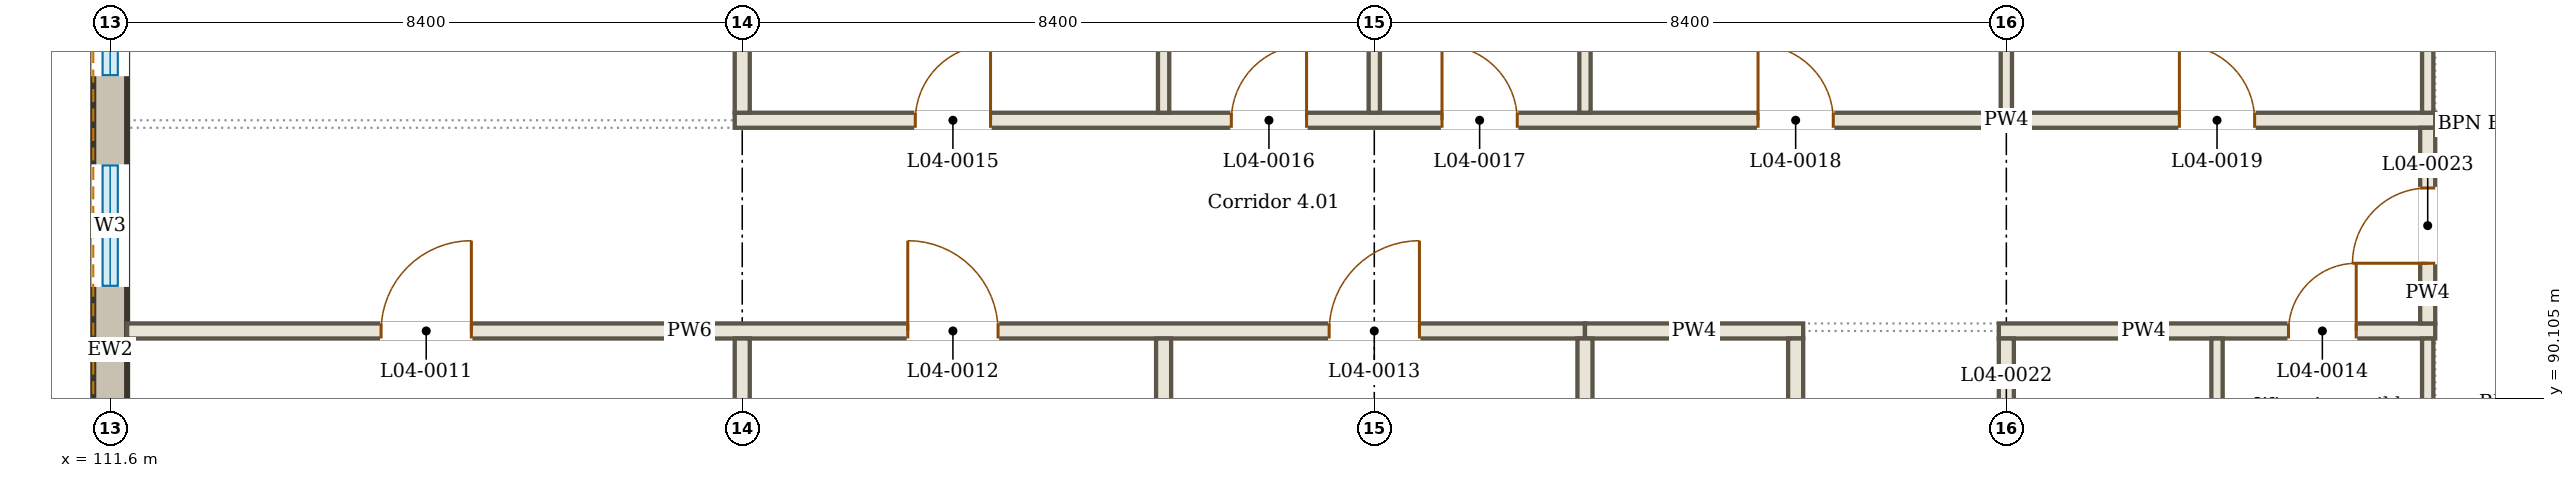
"""IFC4 building model, lengths in metres.
Left out: names, types, materials, properties, quantities, classifications, styles, units other than length and angle.
Written with IfcOpenShell. Run it as: python <this file> out.ifc"""

import sys

from ifc_helpers import new_model, si_unit, direction, frame, frame_2d, origin, place, context, subcontext, project, spatial, rectangle, extrude, element, fill, save


model = new_model("IFC4")
c1 = context("Model", 3, precision=1e-05, world=origin(), true_north=direction((0.0, 1.0)))
c2 = subcontext(c1, "Body", "Model", "MODEL_VIEW")
j1 = project(units=[si_unit("LENGTHUNIT", "METRE"), si_unit("PLANEANGLEUNIT", "RADIAN")], contexts=[c1])
p1 = place(None, origin())
s1 = spatial("IfcSite", under=j1, at=p1, CompositionType="ELEMENT")
p2 = place(p1, origin())
s2 = spatial("IfcBuilding", under=s1, at=p2, CompositionType="ELEMENT")
p3 = place(p2, frame((0.0, 0.0, 18.0)))
s3 = spatial("IfcBuildingStorey", under=s2, at=p3, CompositionType="ELEMENT", Elevation=18.0)
p4 = place(p3, frame((111.6, 88.35, 0.0), z_axis=(0.0, 0.0, 1.0), x_axis=(0.0, 1.0, 0.0)))
e1 = element("IfcWall", 1, at=p4, inside=s3, PredefinedType="SOLIDWALL", context=c2, shape_type="SweptSolid", body=[
    extrude(rectangle(XDim=8.25, YDim=0.45, at=frame_2d((4.125, 0.0))), origin(), (0.0, 0.0, 1.0), 3.8),
])
p5 = place(p4, frame((0.95, 0.0, 2.1)))
e2 = element("IfcOpeningElement", 2, at=p5, cuts=e1, PredefinedType="OPENING", context=c2, shape_type="SweptSolid", body=[
    extrude(rectangle(XDim=0.6, YDim=1.2, at=frame_2d((0.3, 0.6))), frame((0.0, 0.235, 0.0), z_axis=(0.0, -1.0, 0.0), x_axis=(1.0, 0.0, 0.0)), (0.0, 0.0, 1.0), 0.47),
])
p6 = place(p4, frame((3.25, 0.0, 2.7)))
e3 = element("IfcOpeningElement", 3, at=p6, cuts=e1, PredefinedType="OPENING", context=c2, shape_type="SweptSolid", body=[
    extrude(rectangle(XDim=1.6, YDim=0.6, at=frame_2d((0.8, 0.3))), frame((0.0, 0.235, 0.0), z_axis=(0.0, -1.0, 0.0), x_axis=(1.0, 0.0, 0.0)), (0.0, 0.0, 1.0), 0.47),
])
p7 = place(p4, frame((6.05, 0.0, 2.7)))
e4 = element("IfcOpeningElement", 4, at=p7, cuts=e1, PredefinedType="OPENING", context=c2, shape_type="SweptSolid", body=[
    extrude(rectangle(XDim=1.6, YDim=0.6, at=frame_2d((0.8, 0.3))), frame((0.0, 0.235, 0.0), z_axis=(0.0, -1.0, 0.0), x_axis=(1.0, 0.0, 0.0)), (0.0, 0.0, 1.0), 0.47),
])
p8 = place(p3, frame((111.44, 88.35, 3.82), z_axis=(0.0, 0.0, 1.0), x_axis=(0.0, 1.0, 0.0)))
e5 = element("IfcWall", 5, at=p8, inside=s3, PredefinedType="SOLIDWALL", context=c2, shape_type="SweptSolid", body=[
    extrude(rectangle(XDim=8.25, YDim=0.13, at=frame_2d((4.125, 0.0))), origin(), (0.0, 0.0, 1.0), 0.68),
])
p9 = place(p3, frame((111.825, 91.0, 0.0), z_axis=(0.0, 0.0, 1.0), x_axis=(1.0, 0.0, 0.0)))
e6 = element("IfcWall", 6, at=p9, inside=s3, PredefinedType="PARTITIONING", context=c2, shape_type="SweptSolid", body=[
    extrude(rectangle(XDim=19.375, YDim=0.2, at=frame_2d((9.688, 0.0))), origin(), (0.0, 0.0, 1.0), 3.75),
])
p10 = place(p9, frame((3.375, 0.0, 0.0)))
e7 = element("IfcOpeningElement", 7, at=p10, cuts=e6, PredefinedType="OPENING", context=c2, shape_type="SweptSolid", body=[
    extrude(rectangle(XDim=1.2, YDim=2.1, at=frame_2d((0.6, 1.05))), frame((0.0, 0.11, 0.0), z_axis=(0.0, -1.0, 0.0), x_axis=(1.0, 0.0, 0.0)), (0.0, 0.0, 1.0), 0.22),
])
p11 = place(p9, frame((10.375, 0.0, 0.0)))
e8 = element("IfcOpeningElement", 8, at=p11, cuts=e6, PredefinedType="OPENING", context=c2, shape_type="SweptSolid", body=[
    extrude(rectangle(XDim=1.2, YDim=2.1, at=frame_2d((0.6, 1.05))), frame((0.0, 0.11, 0.0), z_axis=(0.0, -1.0, 0.0), x_axis=(1.0, 0.0, 0.0)), (0.0, 0.0, 1.0), 0.22),
])
p12 = place(p9, frame((15.975, 0.0, 0.0)))
e9 = element("IfcOpeningElement", 9, at=p12, cuts=e6, PredefinedType="OPENING", context=c2, shape_type="SweptSolid", body=[
    extrude(rectangle(XDim=1.2, YDim=2.1, at=frame_2d((0.6, 1.05))), frame((0.0, 0.11, 0.0), z_axis=(0.0, -1.0, 0.0), x_axis=(1.0, 0.0, 0.0)), (0.0, 0.0, 1.0), 0.22),
])
p13 = place(p3, frame((131.2, 91.0, 0.0), z_axis=(0.0, 0.0, 1.0), x_axis=(1.0, 0.0, 0.0)))
e10 = element("IfcWall", 10, at=p13, inside=s3, PredefinedType="PARTITIONING", context=c2, shape_type="SweptSolid", body=[
    extrude(rectangle(XDim=2.9, YDim=0.2, at=frame_2d((1.45, 0.0))), origin(), (0.0, 0.0, 1.0), 3.894),
])
p14 = place(p3, frame((136.7, 91.0, 0.0), z_axis=(0.0, 0.0, 1.0), x_axis=(1.0, 0.0, 0.0)))
e11 = element("IfcWall", 11, at=p14, inside=s3, PredefinedType="PARTITIONING", context=c2, shape_type="SweptSolid", body=[
    extrude(rectangle(XDim=5.8, YDim=0.2, at=frame_2d((2.9, 0.0))), origin(), (0.0, 0.0, 1.0), 3.75),
])
p15 = place(p14, frame((3.85, 0.0, 0.0)))
e12 = element("IfcOpeningElement", 12, at=p15, cuts=e11, PredefinedType="OPENING", context=c2, shape_type="SweptSolid", body=[
    extrude(rectangle(XDim=0.9, YDim=2.1, at=frame_2d((0.45, 1.05))), frame((0.0, 0.11, 0.0), z_axis=(0.0, -1.0, 0.0), x_axis=(1.0, 0.0, 0.0)), (0.0, 0.0, 1.0), 0.22),
])
p16 = place(p3, frame((119.9, 93.8, 0.0), z_axis=(0.0, 0.0, 1.0), x_axis=(1.0, 0.0, 0.0)))
e13 = element("IfcWall", 13, at=p16, inside=s3, PredefinedType="PARTITIONING", context=c2, shape_type="SweptSolid", body=[
    extrude(rectangle(XDim=22.6, YDim=0.2, at=frame_2d((11.3, 0.0))), origin(), (0.0, 0.0, 1.0), 3.75),
])
p17 = place(p16, frame((2.4, 0.0, 0.0)))
e14 = element("IfcOpeningElement", 14, at=p17, cuts=e13, PredefinedType="OPENING", context=c2, shape_type="SweptSolid", body=[
    extrude(rectangle(XDim=1.0, YDim=2.1, at=frame_2d((0.5, 1.05))), frame((0.0, 0.11, 0.0), z_axis=(0.0, -1.0, 0.0), x_axis=(1.0, 0.0, 0.0)), (0.0, 0.0, 1.0), 0.22),
])
p18 = place(p16, frame((6.6, 0.0, 0.0)))
e15 = element("IfcOpeningElement", 15, at=p18, cuts=e13, PredefinedType="OPENING", context=c2, shape_type="SweptSolid", body=[
    extrude(rectangle(XDim=1.0, YDim=2.1, at=frame_2d((0.5, 1.05))), frame((0.0, 0.11, 0.0), z_axis=(0.0, -1.0, 0.0), x_axis=(1.0, 0.0, 0.0)), (0.0, 0.0, 1.0), 0.22),
])
p19 = place(p16, frame((9.4, 0.0, 0.0)))
e16 = element("IfcOpeningElement", 16, at=p19, cuts=e13, PredefinedType="OPENING", context=c2, shape_type="SweptSolid", body=[
    extrude(rectangle(XDim=1.0, YDim=2.1, at=frame_2d((0.5, 1.05))), frame((0.0, 0.11, 0.0), z_axis=(0.0, -1.0, 0.0), x_axis=(1.0, 0.0, 0.0)), (0.0, 0.0, 1.0), 0.22),
])
p20 = place(p16, frame((13.6, 0.0, 0.0)))
e17 = element("IfcOpeningElement", 17, at=p20, cuts=e13, PredefinedType="OPENING", context=c2, shape_type="SweptSolid", body=[
    extrude(rectangle(XDim=1.0, YDim=2.1, at=frame_2d((0.5, 1.05))), frame((0.0, 0.11, 0.0), z_axis=(0.0, -1.0, 0.0), x_axis=(1.0, 0.0, 0.0)), (0.0, 0.0, 1.0), 0.22),
])
p21 = place(p16, frame((19.2, 0.0, 0.0)))
e18 = element("IfcOpeningElement", 18, at=p21, cuts=e13, PredefinedType="OPENING", context=c2, shape_type="SweptSolid", body=[
    extrude(rectangle(XDim=1.0, YDim=2.1, at=frame_2d((0.5, 1.05))), frame((0.0, 0.11, 0.0), z_axis=(0.0, -1.0, 0.0), x_axis=(1.0, 0.0, 0.0)), (0.0, 0.0, 1.0), 0.22),
])
p22 = place(p3, frame((120.0, 88.397, 0.0), z_axis=(0.0, 0.0, 1.0), x_axis=(0.0, 1.0, 0.0)))
e19 = element("IfcWall", 19, at=p22, inside=s3, PredefinedType="PARTITIONING", context=c2, shape_type="SweptSolid", body=[
    extrude(rectangle(XDim=2.502, YDim=0.2, at=frame_2d((1.251, 0.0))), origin(), (0.0, 0.0, 1.0), 3.75),
])
p23 = place(p3, frame((120.0, 93.9, 0.0), z_axis=(0.0, 0.0, 1.0), x_axis=(0.0, 1.0, 0.0)))
e20 = element("IfcWall", 20, at=p23, inside=s3, PredefinedType="PARTITIONING", context=c2, shape_type="SweptSolid", body=[
    extrude(rectangle(XDim=2.7, YDim=0.2, at=frame_2d((1.35, 0.0))), origin(), (0.0, 0.0, 1.0), 3.75),
])
p24 = place(p3, frame((125.6, 80.025, 0.0), z_axis=(0.0, 0.0, 1.0), x_axis=(0.0, 1.0, 0.0)))
e21 = element("IfcWall", 21, at=p24, inside=s3, PredefinedType="PARTITIONING", context=c2, shape_type="SweptSolid", body=[
    extrude(rectangle(XDim=10.875, YDim=0.2, at=frame_2d((5.438, 0.0))), origin(), (0.0, 0.0, 1.0), 3.75),
])
p25 = place(p3, frame((125.6, 93.9, 0.0), z_axis=(0.0, 0.0, 1.0), x_axis=(0.0, 1.0, 0.0)))
e22 = element("IfcWall", 22, at=p25, inside=s3, PredefinedType="PARTITIONING", context=c2, shape_type="SweptSolid", body=[
    extrude(rectangle(XDim=10.875, YDim=0.15, at=frame_2d((5.438, 0.0))), origin(), (0.0, 0.0, 1.0), 3.75),
])
p26 = place(p3, frame((128.4, 93.9, 0.0), z_axis=(0.0, 0.0, 1.0), x_axis=(0.0, 1.0, 0.0)))
e23 = element("IfcWall", 23, at=p26, inside=s3, PredefinedType="PARTITIONING", context=c2, shape_type="SweptSolid", body=[
    extrude(rectangle(XDim=2.503, YDim=0.15, at=frame_2d((1.251, 0.0))), origin(), (0.0, 0.0, 1.0), 3.75),
])
p27 = place(p3, frame((131.2, 80.025, 0.0), z_axis=(0.0, 0.0, 1.0), x_axis=(0.0, 1.0, 0.0)))
e24 = element("IfcWall", 24, at=p27, inside=s3, PredefinedType="PARTITIONING", context=c2, shape_type="SweptSolid", body=[
    extrude(rectangle(XDim=10.875, YDim=0.2, at=frame_2d((5.438, 0.0))), origin(), (0.0, 0.0, 1.0), 3.75),
])
p28 = place(p3, frame((131.2, 93.9, 0.0), z_axis=(0.0, 0.0, 1.0), x_axis=(0.0, 1.0, 0.0)))
e25 = element("IfcWall", 25, at=p28, inside=s3, PredefinedType="PARTITIONING", context=c2, shape_type="SweptSolid", body=[
    extrude(rectangle(XDim=10.875, YDim=0.15, at=frame_2d((5.438, 0.0))), origin(), (0.0, 0.0, 1.0), 3.75),
])
p29 = place(p3, frame((134.0, 82.3, 0.0), z_axis=(0.0, 0.0, 1.0), x_axis=(0.0, 1.0, 0.0)))
e26 = element("IfcWall", 26, at=p29, inside=s3, PredefinedType="PARTITIONING", context=c2, shape_type="SweptSolid", body=[
    extrude(rectangle(XDim=8.6, YDim=0.2, at=frame_2d((4.3, 0.0))), origin(), (0.0, 0.0, 1.0), 3.75),
])
p30 = place(p29, frame((3.8, 0.0, 0.0)))
e27 = element("IfcOpeningElement", 27, at=p30, cuts=e26, PredefinedType="OPENING", context=c2, shape_type="SweptSolid", body=[
    extrude(rectangle(XDim=1.0, YDim=2.1, at=frame_2d((0.5, 1.05))), frame((0.0, 0.11, 0.0), z_axis=(0.0, -1.0, 0.0), x_axis=(1.0, 0.0, 0.0)), (0.0, 0.0, 1.0), 0.22),
])
p31 = place(p3, frame((136.8, 88.2, 0.0), z_axis=(0.0, 0.0, 1.0), x_axis=(0.0, 1.0, 0.0)))
e28 = element("IfcWall", 28, at=p31, inside=s3, PredefinedType="PARTITIONING", context=c2, shape_type="SweptSolid", body=[
    extrude(rectangle(XDim=2.7, YDim=0.2, at=frame_2d((1.35, 0.0))), origin(), (0.0, 0.0, 1.0), 3.75),
])
p32 = place(p31, frame((0.95, 0.0, 0.0)))
e29 = element("IfcOpeningElement", 29, at=p32, cuts=e28, PredefinedType="OPENING", context=c2, shape_type="SweptSolid", body=[
    extrude(rectangle(XDim=0.9, YDim=2.1, at=frame_2d((0.45, 1.05))), frame((0.0, 0.11, 0.0), z_axis=(0.0, -1.0, 0.0), x_axis=(1.0, 0.0, 0.0)), (0.0, 0.0, 1.0), 0.22),
])
p33 = place(p3, frame((136.8, 93.9, 0.0), z_axis=(0.0, 0.0, 1.0), x_axis=(0.0, 1.0, 0.0)))
e30 = element("IfcWall", 30, at=p33, inside=s3, PredefinedType="PARTITIONING", context=c2, shape_type="SweptSolid", body=[
    extrude(rectangle(XDim=2.503, YDim=0.15, at=frame_2d((1.251, 0.0))), origin(), (0.0, 0.0, 1.0), 3.75),
])
for number, where, z_axis, x_axis in (
    (31, (139.6, 88.2, 0.0), (0.0, 0.0, 1.0), (0.0, 1.0, 0.0)),
    (32, (142.4, 88.2, 0.0), (0.0, 0.0, 1.0), (0.0, 1.0, 0.0)),
):
    element("IfcWall", number, at=place(p3, frame(where, z_axis=z_axis, x_axis=x_axis)), inside=s3, PredefinedType="PARTITIONING", context=c2, shape_type="SweptSolid", body=[
        extrude(rectangle(XDim=2.7, YDim=0.15, at=frame_2d((1.35, 0.0))), origin(), (0.0, 0.0, 1.0), 3.894),
    ])
p34 = place(p3, frame((142.4, 91.1, 0.0), z_axis=(0.0, 0.0, 1.0), x_axis=(0.0, 1.0, 0.0)))
e33 = element("IfcWall", 33, at=p34, inside=s3, PredefinedType="PARTITIONING", context=c2, shape_type="SweptSolid", body=[
    extrude(rectangle(XDim=2.6, YDim=0.2, at=frame_2d((1.3, 0.0))), origin(), (0.0, 0.0, 1.0), 3.894),
])
p35 = place(p34, frame((0.8, 0.0, 0.0)))
e34 = element("IfcOpeningElement", 34, at=p35, cuts=e33, PredefinedType="OPENING", context=c2, shape_type="SweptSolid", body=[
    extrude(rectangle(XDim=1.0, YDim=2.1, at=frame_2d((0.5, 1.05))), frame((0.0, 0.11, 0.0), z_axis=(0.0, -1.0, 0.0), x_axis=(1.0, 0.0, 0.0)), (0.0, 0.0, 1.0), 0.22),
])
p36 = place(p3, frame((142.4, 93.9, 0.0), z_axis=(0.0, 0.0, 1.0), x_axis=(0.0, 1.0, 0.0)))
e35 = element("IfcWall", 35, at=p36, inside=s3, PredefinedType="PARTITIONING", context=c2, shape_type="SweptSolid", body=[
    extrude(rectangle(XDim=10.875, YDim=0.15, at=frame_2d((5.438, 0.0))), origin(), (0.0, 0.0, 1.0), 3.75),
])
p37 = place(p6, origin())
e36 = element("IfcWindow", 36, at=p37, inside=s3, PartitioningType="SINGLE_PANEL", PredefinedType="WINDOW", context=c2, shape_type="SweptSolid", body=[
    extrude(rectangle(XDim=1.6, YDim=0.6, at=frame_2d((0.8, 0.3))), frame((0.0, 0.03, 0.0), z_axis=(0.0, -1.0, 0.0), x_axis=(1.0, 0.0, 0.0)), (0.0, 0.0, 1.0), 0.06),
])
fill(e3, e36)
p38 = place(p7, origin())
e37 = element("IfcWindow", 37, at=p38, inside=s3, PartitioningType="SINGLE_PANEL", PredefinedType="WINDOW", context=c2, shape_type="SweptSolid", body=[
    extrude(rectangle(XDim=1.6, YDim=0.6, at=frame_2d((0.8, 0.3))), frame((0.0, 0.03, 0.0), z_axis=(0.0, -1.0, 0.0), x_axis=(1.0, 0.0, 0.0)), (0.0, 0.0, 1.0), 0.06),
])
fill(e4, e37)
p39 = place(p10, origin())
e38 = element("IfcDoor", 38, at=p39, inside=s3, OperationType="SINGLE_SWING_RIGHT", PredefinedType="DOOR", context=c2, shape_type="SweptSolid", body=[
    extrude(rectangle(XDim=1.2, YDim=2.1, at=frame_2d((0.6, 1.05))), frame((0.0, 0.025, 0.0), z_axis=(0.0, -1.0, 0.0), x_axis=(1.0, 0.0, 0.0)), (0.0, 0.0, 1.0), 0.05),
])
fill(e7, e38)
p40 = place(p11, origin())
e39 = element("IfcDoor", 39, at=p40, inside=s3, OperationType="SINGLE_SWING_LEFT", PredefinedType="DOOR", context=c2, shape_type="SweptSolid", body=[
    extrude(rectangle(XDim=1.2, YDim=2.1, at=frame_2d((0.6, 1.05))), frame((0.0, 0.025, 0.0), z_axis=(0.0, -1.0, 0.0), x_axis=(1.0, 0.0, 0.0)), (0.0, 0.0, 1.0), 0.05),
])
fill(e8, e39)
p41 = place(p12, origin())
e40 = element("IfcDoor", 40, at=p41, inside=s3, OperationType="SINGLE_SWING_RIGHT", PredefinedType="DOOR", context=c2, shape_type="SweptSolid", body=[
    extrude(rectangle(XDim=1.2, YDim=2.1, at=frame_2d((0.6, 1.05))), frame((0.0, 0.025, 0.0), z_axis=(0.0, -1.0, 0.0), x_axis=(1.0, 0.0, 0.0)), (0.0, 0.0, 1.0), 0.05),
])
fill(e9, e40)
p42 = place(p15, origin())
e41 = element("IfcDoor", 41, at=p42, inside=s3, OperationType="SINGLE_SWING_RIGHT", PredefinedType="DOOR", context=c2, shape_type="SweptSolid", body=[
    extrude(rectangle(XDim=0.9, YDim=2.1, at=frame_2d((0.45, 1.05))), frame((0.0, 0.025, 0.0), z_axis=(0.0, -1.0, 0.0), x_axis=(1.0, 0.0, 0.0)), (0.0, 0.0, 1.0), 0.05),
])
fill(e12, e41)
p43 = place(p17, origin())
e42 = element("IfcDoor", 42, at=p43, inside=s3, OperationType="SINGLE_SWING_RIGHT", PredefinedType="DOOR", context=c2, shape_type="SweptSolid", body=[
    extrude(rectangle(XDim=1.0, YDim=2.1, at=frame_2d((0.5, 1.05))), frame((0.0, 0.025, 0.0), z_axis=(0.0, -1.0, 0.0), x_axis=(1.0, 0.0, 0.0)), (0.0, 0.0, 1.0), 0.05),
])
fill(e14, e42)
p44 = place(p18, origin())
e43 = element("IfcDoor", 43, at=p44, inside=s3, OperationType="SINGLE_SWING_RIGHT", PredefinedType="DOOR", context=c2, shape_type="SweptSolid", body=[
    extrude(rectangle(XDim=1.0, YDim=2.1, at=frame_2d((0.5, 1.05))), frame((0.0, 0.025, 0.0), z_axis=(0.0, -1.0, 0.0), x_axis=(1.0, 0.0, 0.0)), (0.0, 0.0, 1.0), 0.05),
])
fill(e15, e43)
p45 = place(p19, origin())
e44 = element("IfcDoor", 44, at=p45, inside=s3, OperationType="SINGLE_SWING_LEFT", PredefinedType="DOOR", context=c2, shape_type="SweptSolid", body=[
    extrude(rectangle(XDim=1.0, YDim=2.1, at=frame_2d((0.5, 1.05))), frame((0.0, 0.025, 0.0), z_axis=(0.0, -1.0, 0.0), x_axis=(1.0, 0.0, 0.0)), (0.0, 0.0, 1.0), 0.05),
])
fill(e16, e44)
p46 = place(p20, origin())
e45 = element("IfcDoor", 45, at=p46, inside=s3, OperationType="SINGLE_SWING_LEFT", PredefinedType="DOOR", context=c2, shape_type="SweptSolid", body=[
    extrude(rectangle(XDim=1.0, YDim=2.1, at=frame_2d((0.5, 1.05))), frame((0.0, 0.025, 0.0), z_axis=(0.0, -1.0, 0.0), x_axis=(1.0, 0.0, 0.0)), (0.0, 0.0, 1.0), 0.05),
])
fill(e17, e45)
p47 = place(p21, origin())
e46 = element("IfcDoor", 46, at=p47, inside=s3, OperationType="SINGLE_SWING_LEFT", PredefinedType="DOOR", context=c2, shape_type="SweptSolid", body=[
    extrude(rectangle(XDim=1.0, YDim=2.1, at=frame_2d((0.5, 1.05))), frame((0.0, 0.025, 0.0), z_axis=(0.0, -1.0, 0.0), x_axis=(1.0, 0.0, 0.0)), (0.0, 0.0, 1.0), 0.05),
])
fill(e18, e46)
p48 = place(p35, origin())
e47 = element("IfcDoor", 47, at=p48, inside=s3, OperationType="SINGLE_SWING_LEFT", PredefinedType="DOOR", context=c2, shape_type="SweptSolid", body=[
    extrude(rectangle(XDim=1.0, YDim=2.1, at=frame_2d((0.5, 1.05))), frame((0.0, 0.025, 0.0), z_axis=(0.0, -1.0, 0.0), x_axis=(1.0, 0.0, 0.0)), (0.0, 0.0, 1.0), 0.05),
])
fill(e34, e47)
save(model, sys.argv[1])
